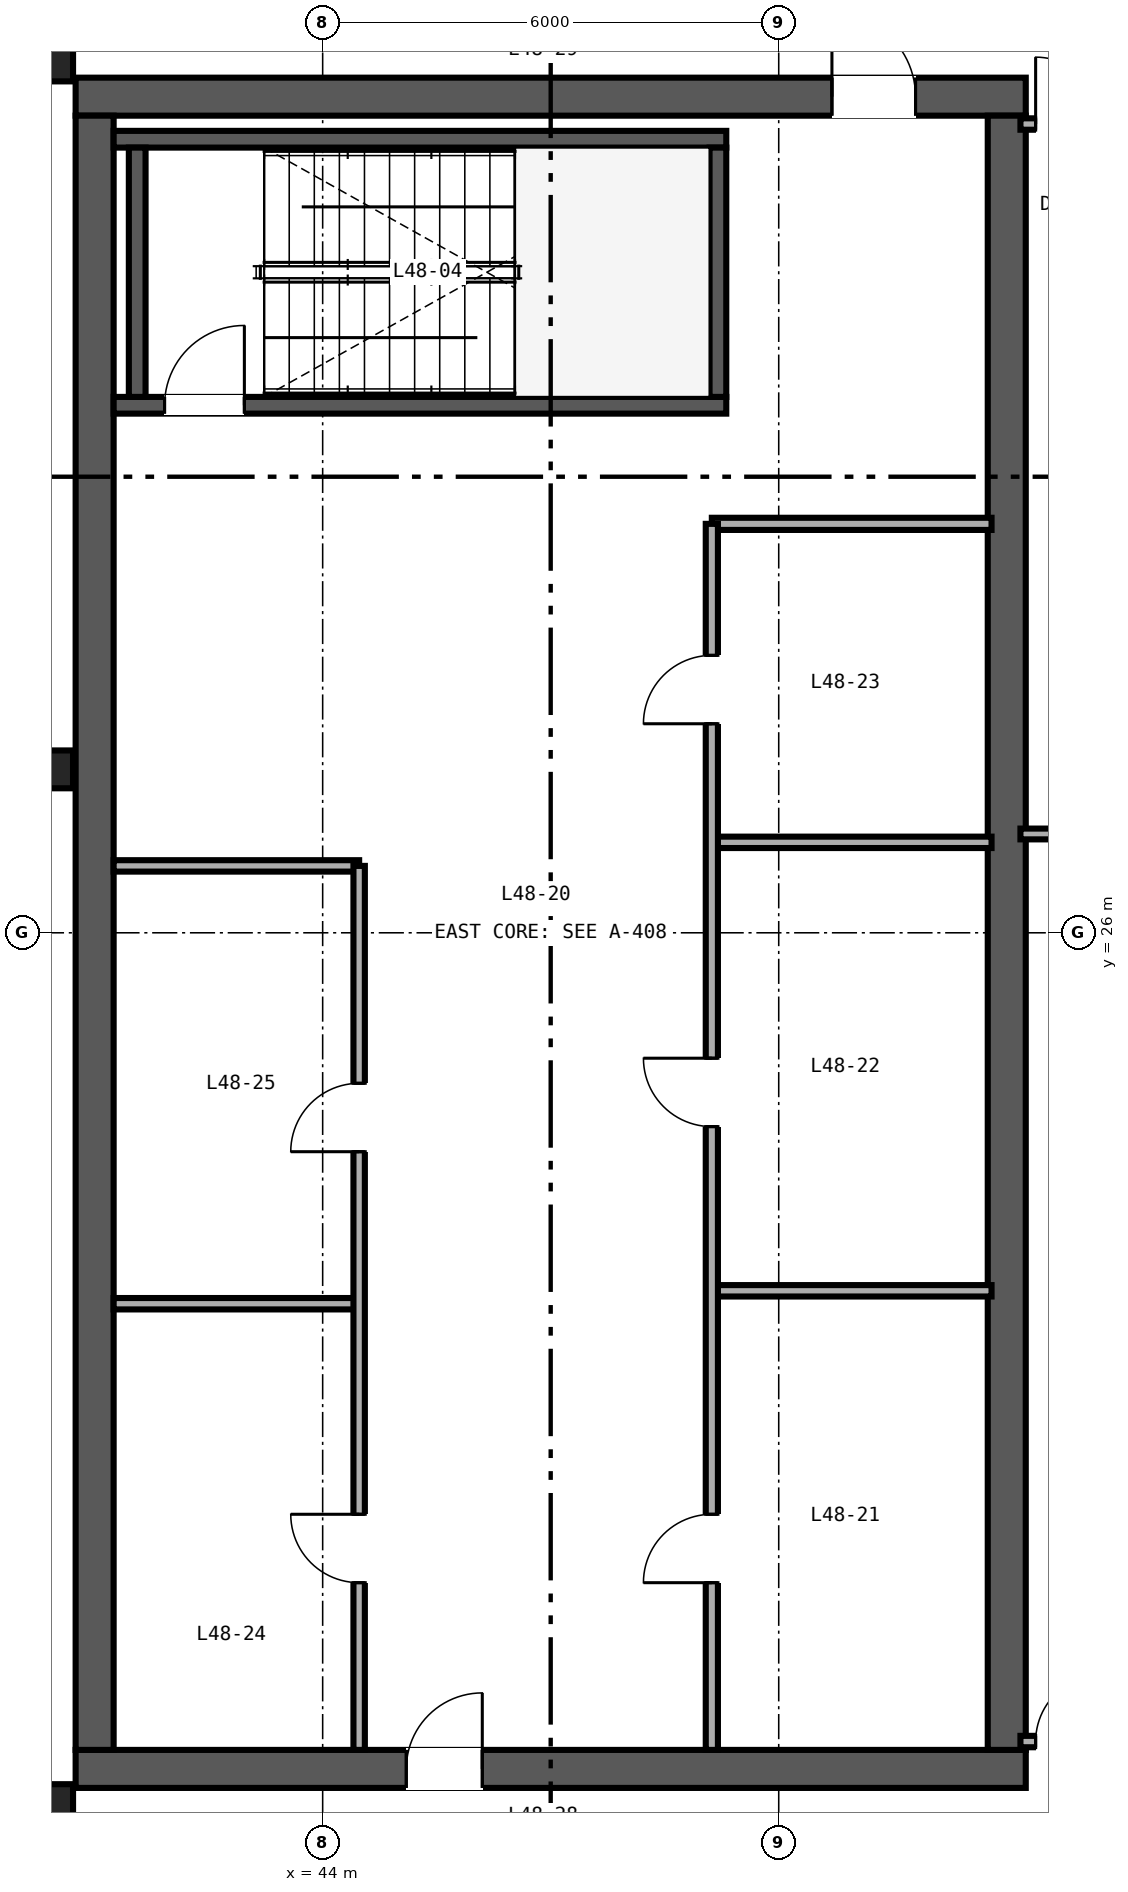
"""IFC4 building model, lengths in metres.
Left out: names, types, materials, properties, quantities, classifications, styles, units other than length and angle.
Written with IfcOpenShell. Run it as: python <this file> out.ifc"""

import sys

from ifc_helpers import new_model, si_unit, direction, frame, frame_2d, origin, origin_2d, place, context, subcontext, project, spatial, rectangle, i_section, extrude, source, transform, mapped, element, fill, save


model = new_model("IFC4")
c1 = context("Model", 3, precision=1e-05, world=origin(), true_north=direction((0.0, 1.0)))
c2 = subcontext(c1, "Body", "Model", "MODEL_VIEW")
j1 = project(units=[si_unit("LENGTHUNIT", "METRE"), si_unit("PLANEANGLEUNIT", "RADIAN")], contexts=[c1])
p1 = place(None, origin())
s1 = spatial("IfcSite", under=j1, at=p1, CompositionType="ELEMENT")
p2 = place(p1, origin())
s2 = spatial("IfcBuilding", under=s1, at=p2, CompositionType="ELEMENT")
p3 = place(p2, frame((0.0, 0.0, 192.0)))
s3 = spatial("IfcBuildingStorey", under=s2, at=p3, CompositionType="ELEMENT", Elevation=192.0)
p4 = place(p3, frame((40.75, 15.0, 0.0), z_axis=(0.0, 0.0, 1.0), x_axis=(1.0, 0.0, 0.0)))
e1 = element("IfcWall", 1, at=p4, inside=s3, PredefinedType="SHEAR", context=c2, shape_type="SweptSolid", body=[
    extrude(rectangle(XDim=12.5, YDim=0.5, at=frame_2d((6.25, 0.0))), origin(), (0.0, 0.0, 1.0), 3.37),
])
p5 = place(p4, frame((4.35, 0.0, 0.0)))
e2 = element("IfcOpeningElement", 2, at=p5, cuts=e1, PredefinedType="OPENING", context=c2, shape_type="SweptSolid", body=[
    extrude(rectangle(XDim=1.0, YDim=2.15, at=frame_2d((0.5, 1.075))), frame((0.0, 0.26, 0.0), z_axis=(0.0, -1.0, 0.0), x_axis=(1.0, 0.0, 0.0)), (0.0, 0.0, 1.0), 0.52),
])
p6 = place(p3, frame((40.75, 37.0, 0.0), z_axis=(0.0, 0.0, 1.0), x_axis=(1.0, 0.0, 0.0)))
e3 = element("IfcWall", 3, at=p6, inside=s3, PredefinedType="SHEAR", context=c2, shape_type="SweptSolid", body=[
    extrude(rectangle(XDim=12.5, YDim=0.5, at=frame_2d((6.25, 0.0))), origin(), (0.0, 0.0, 1.0), 3.37),
])
p7 = place(p6, frame((9.95, 0.0, 0.0)))
e4 = element("IfcOpeningElement", 4, at=p7, cuts=e3, PredefinedType="OPENING", context=c2, shape_type="SweptSolid", body=[
    extrude(rectangle(XDim=1.1, YDim=2.15, at=frame_2d((0.55, 1.075))), frame((0.0, 0.26, 0.0), z_axis=(0.0, -1.0, 0.0), x_axis=(1.0, 0.0, 0.0)), (0.0, 0.0, 1.0), 0.52),
])
for number, where, z_axis, x_axis in (
    (5, (41.0, 15.25, 0.0), (0.0, 0.0, 1.0), (0.0, 1.0, 0.0)),
    (6, (53.0, 15.25, 0.0), (0.0, 0.0, 1.0), (0.0, 1.0, 0.0)),
):
    element("IfcWall", number, at=place(p3, frame(where, z_axis=z_axis, x_axis=x_axis)), inside=s3, PredefinedType="SHEAR", context=c2, shape_type="SweptSolid", body=[
        extrude(rectangle(XDim=21.5, YDim=0.5, at=frame_2d((10.75, 0.0))), origin(), (0.0, 0.0, 1.0), 3.37),
    ])
p8 = place(p3, frame((41.25, 32.94, 0.0), z_axis=(0.0, 0.0, 1.0), x_axis=(1.0, 0.0, 0.0)))
e7 = element("IfcWall", 7, at=p8, inside=s3, PredefinedType="SHEAR", context=c2, shape_type="SweptSolid", body=[
    extrude(rectangle(XDim=8.06, YDim=0.22, at=frame_2d((4.03, 0.0))), origin(), (0.0, 0.0, 1.0), 3.4),
])
p9 = place(p8, frame((0.67, 0.0, 0.0)))
e8 = element("IfcOpeningElement", 8, at=p9, cuts=e7, PredefinedType="OPENING", context=c2, shape_type="SweptSolid", body=[
    extrude(rectangle(XDim=1.05, YDim=2.15, at=frame_2d((0.525, 1.075))), frame((0.0, 0.12, 0.0), z_axis=(0.0, -1.0, 0.0), x_axis=(1.0, 0.0, 0.0)), (0.0, 0.0, 1.0), 0.24),
])
p10 = place(p3, frame((41.25, 36.44, 0.0), z_axis=(0.0, 0.0, 1.0), x_axis=(1.0, 0.0, 0.0)))
e9 = element("IfcWall", 9, at=p10, inside=s3, PredefinedType="SHEAR", context=c2, shape_type="SweptSolid", body=[
    extrude(rectangle(XDim=8.06, YDim=0.22, at=frame_2d((4.03, 0.0))), origin(), (0.0, 0.0, 1.0), 3.4),
])
for number, where, z_axis, x_axis in (
    (10, (41.56, 33.05, 0.0), (0.0, 0.0, 1.0), (0.0, 1.0, 0.0)),
    (11, (49.2, 33.05, 0.0), (0.0, 0.0, 1.0), (0.0, 1.0, 0.0)),
):
    element("IfcWall", number, at=place(p3, frame(where, z_axis=z_axis, x_axis=x_axis)), inside=s3, PredefinedType="SHEAR", context=c2, shape_type="SweptSolid", body=[
        extrude(rectangle(XDim=3.28, YDim=0.22, at=frame_2d((1.64, 0.0))), origin(), (0.0, 0.0, 1.0), 3.4),
    ])
m1 = source(origin(), c2, "Body", "SweptSolid", [
    extrude(i_section(OverallWidth=0.432, OverallDepth=0.498, WebThickness=0.056, FlangeThickness=0.089, FilletRadius=0.025, at=origin_2d()), origin(), (0.0, 0.0, 1.0), 3.37),
])
for number, where, z_axis, x_axis in (
    (12, (40.5, 14.55, 0.0), (0.0, 0.0, 1.0), (1.0, 0.0, 0.0)),
    (13, (40.5, 28.15, 0.0), (0.0, 0.0, 1.0), (1.0, 0.0, 0.0)),
    (14, (40.5, 37.45, 0.0), (0.0, 0.0, 1.0), (1.0, 0.0, 0.0)),
):
    element("IfcColumn", number, at=place(p3, frame(where, z_axis=z_axis, x_axis=x_axis)), inside=s3, PredefinedType="COLUMN", context=c2, shape_type="MappedRepresentation", body=[
        mapped(m1, transform((0.0, 0.0, 0.0), scale=1.0)),
    ])
p11 = place(p3, frame((49.12, 31.38, 0.0), z_axis=(0.0, 0.0, 1.0), x_axis=(1.0, 0.0, 0.0)))
e15 = element("IfcWall", 15, at=p11, inside=s3, PredefinedType="PARTITIONING", context=c2, shape_type="SweptSolid", body=[
    extrude(rectangle(XDim=3.68, YDim=0.16, at=frame_2d((1.84, 0.0))), origin(), (0.0, 0.0, 1.0), 2.47),
])
for number, where, z_axis, x_axis in (
    (16, (49.12, 21.29, 0.0), (0.0, 0.0, 1.0), (1.0, 0.0, 0.0)),
    (17, (49.12, 27.19, 0.0), (0.0, 0.0, 1.0), (1.0, 0.0, 0.0)),
):
    element("IfcWall", number, at=place(p3, frame(where, z_axis=z_axis, x_axis=x_axis)), inside=s3, PredefinedType="PARTITIONING", context=c2, shape_type="SweptSolid", body=[
        extrude(rectangle(XDim=3.68, YDim=0.15, at=frame_2d((1.84, 0.0))), origin(), (0.0, 0.0, 1.0), 3.37),
    ])
p12 = place(p3, frame((49.12, 15.25, 0.0), z_axis=(0.0, 0.0, 1.0), x_axis=(0.0, 1.0, 0.0)))
e18 = element("IfcWall", 18, at=p12, inside=s3, PredefinedType="PARTITIONING", context=c2, shape_type="SweptSolid", body=[
    extrude(rectangle(XDim=16.13, YDim=0.16, at=frame_2d((8.065, 0.0))), origin(), (0.0, 0.0, 1.0), 2.443),
])
p13 = place(p12, frame((2.2, 0.0, 0.0)))
e19 = element("IfcOpeningElement", 19, at=p13, cuts=e18, PredefinedType="OPENING", context=c2, shape_type="SweptSolid", body=[
    extrude(rectangle(XDim=0.9, YDim=2.15, at=frame_2d((0.45, 1.075))), frame((0.0, 0.09, 0.0), z_axis=(0.0, -1.0, 0.0), x_axis=(1.0, 0.0, 0.0)), (0.0, 0.0, 1.0), 0.18),
])
p14 = place(p12, frame((8.2, 0.0, 0.0)))
e20 = element("IfcOpeningElement", 20, at=p14, cuts=e18, PredefinedType="OPENING", context=c2, shape_type="SweptSolid", body=[
    extrude(rectangle(XDim=0.9, YDim=2.15, at=frame_2d((0.45, 1.075))), frame((0.0, 0.09, 0.0), z_axis=(0.0, -1.0, 0.0), x_axis=(1.0, 0.0, 0.0)), (0.0, 0.0, 1.0), 0.18),
])
p15 = place(p12, frame((13.5, 0.0, 0.0)))
e21 = element("IfcOpeningElement", 21, at=p15, cuts=e18, PredefinedType="OPENING", context=c2, shape_type="SweptSolid", body=[
    extrude(rectangle(XDim=0.9, YDim=2.15, at=frame_2d((0.45, 1.075))), frame((0.0, 0.09, 0.0), z_axis=(0.0, -1.0, 0.0), x_axis=(1.0, 0.0, 0.0)), (0.0, 0.0, 1.0), 0.18),
])
for number, where, z_axis, x_axis in (
    (22, (41.25, 26.88, 0.0), (0.0, 0.0, 1.0), (1.0, 0.0, 0.0)),
    (23, (41.25, 21.12, 0.0), (0.0, 0.0, 1.0), (1.0, 0.0, 0.0)),
):
    element("IfcWall", number, at=place(p3, frame(where, z_axis=z_axis, x_axis=x_axis)), inside=s3, PredefinedType="PARTITIONING", context=c2, shape_type="SweptSolid", body=[
        extrude(rectangle(XDim=3.23, YDim=0.15, at=frame_2d((1.615, 0.0))), origin(), (0.0, 0.0, 1.0), 3.37),
    ])
p16 = place(p3, frame((44.48, 15.25, 0.0), z_axis=(0.0, 0.0, 1.0), x_axis=(0.0, 1.0, 0.0)))
e24 = element("IfcWall", 24, at=p16, inside=s3, PredefinedType="PARTITIONING", context=c2, shape_type="SweptSolid", body=[
    extrude(rectangle(XDim=11.63, YDim=0.15, at=frame_2d((5.815, 0.0))), origin(), (0.0, 0.0, 1.0), 3.37),
])
p17 = place(p16, frame((2.2, 0.0, 0.0)))
e25 = element("IfcOpeningElement", 25, at=p17, cuts=e24, PredefinedType="OPENING", context=c2, shape_type="SweptSolid", body=[
    extrude(rectangle(XDim=0.9, YDim=2.15, at=frame_2d((0.45, 1.075))), frame((0.0, 0.085, 0.0), z_axis=(0.0, -1.0, 0.0), x_axis=(1.0, 0.0, 0.0)), (0.0, 0.0, 1.0), 0.17),
])
p18 = place(p16, frame((7.87, 0.0, 0.0)))
e26 = element("IfcOpeningElement", 26, at=p18, cuts=e24, PredefinedType="OPENING", context=c2, shape_type="SweptSolid", body=[
    extrude(rectangle(XDim=0.9, YDim=2.15, at=frame_2d((0.45, 1.075))), frame((0.0, 0.085, 0.0), z_axis=(0.0, -1.0, 0.0), x_axis=(1.0, 0.0, 0.0)), (0.0, 0.0, 1.0), 0.17),
])
p19 = place(p3, frame((53.18, 15.36, 0.0), z_axis=(0.0, 0.0, 1.0), x_axis=(1.0, 0.0, 0.0)))
e27 = element("IfcWall", 27, at=p19, inside=s3, PredefinedType="PARTITIONING", context=c2, shape_type="SweptSolid", body=[
    extrude(rectangle(XDim=2.66, YDim=0.15, at=frame_2d((1.33, 0.0))), origin(), (0.0, 0.0, 1.0), 2.591),
])
p20 = place(p19, frame((0.2, 0.0, 0.0)))
e28 = element("IfcOpeningElement", 28, at=p20, cuts=e27, PredefinedType="OPENING", context=c2, shape_type="SweptSolid", body=[
    extrude(rectangle(XDim=0.88, YDim=2.15, at=frame_2d((0.44, 1.075))), frame((0.0, 0.085, 0.0), z_axis=(0.0, -1.0, 0.0), x_axis=(1.0, 0.0, 0.0)), (0.0, 0.0, 1.0), 0.17),
])
p21 = place(p3, frame((53.18, 36.64, 0.0), z_axis=(0.0, 0.0, 1.0), x_axis=(1.0, 0.0, 0.0)))
e29 = element("IfcWall", 29, at=p21, inside=s3, PredefinedType="PARTITIONING", context=c2, shape_type="SweptSolid", body=[
    extrude(rectangle(XDim=2.66, YDim=0.15, at=frame_2d((1.33, 0.0))), origin(), (0.0, 0.0, 1.0), 2.753),
])
p22 = place(p21, frame((0.2, 0.0, 0.0)))
e30 = element("IfcOpeningElement", 30, at=p22, cuts=e29, PredefinedType="OPENING", context=c2, shape_type="SweptSolid", body=[
    extrude(rectangle(XDim=0.88, YDim=2.15, at=frame_2d((0.44, 1.075))), frame((0.0, 0.085, 0.0), z_axis=(0.0, -1.0, 0.0), x_axis=(1.0, 0.0, 0.0)), (0.0, 0.0, 1.0), 0.17),
])
p23 = place(p3, frame((53.18, 27.3, 0.0), z_axis=(0.0, 0.0, 1.0), x_axis=(1.0, 0.0, 0.0)))
e31 = element("IfcWall", 31, at=p23, inside=s3, PredefinedType="PARTITIONING", context=c2, shape_type="SweptSolid", body=[
    extrude(rectangle(XDim=2.66, YDim=0.142, at=frame_2d((1.33, 0.0))), origin(), (0.0, 0.0, 1.0), 2.591),
])
m2 = source(origin(), c2, "Body", "SweptSolid", [
    extrude(rectangle(XDim=1.05, YDim=2.15, at=frame_2d((0.525, 1.075))), frame((0.0, 0.025, 0.0), z_axis=(0.0, -1.0, 0.0), x_axis=(1.0, 0.0, 0.0)), (0.0, 0.0, 1.0), 0.05),
])
p24 = place(p9, origin())
e32 = element("IfcDoor", 32, at=p24, inside=s3, OperationType="SINGLE_SWING_RIGHT", PredefinedType="DOOR", context=c2, shape_type="MappedRepresentation", body=[
    mapped(m2, transform((0.0, 0.0, 0.0), scale=1.0)),
])
fill(e8, e32)
m3 = source(origin(), c2, "Body", "SweptSolid", [
    extrude(rectangle(XDim=1.0, YDim=2.15, at=frame_2d((0.5, 1.075))), frame((0.0, 0.025, 0.0), z_axis=(0.0, -1.0, 0.0), x_axis=(1.0, 0.0, 0.0)), (0.0, 0.0, 1.0), 0.05),
])
p25 = place(p5, origin())
e33 = element("IfcDoor", 33, at=p25, inside=s3, OperationType="SINGLE_SWING_RIGHT", PredefinedType="DOOR", context=c2, shape_type="MappedRepresentation", body=[
    mapped(m3, transform((0.0, 0.0, 0.0), scale=1.0)),
])
fill(e2, e33)
m4 = source(origin(), c2, "Body", "SweptSolid", [
    extrude(rectangle(XDim=1.1, YDim=2.15, at=frame_2d((0.55, 1.075))), frame((0.0, 0.025, 0.0), z_axis=(0.0, -1.0, 0.0), x_axis=(1.0, 0.0, 0.0)), (0.0, 0.0, 1.0), 0.05),
])
p26 = place(p7, origin())
e34 = element("IfcDoor", 34, at=p26, inside=s3, OperationType="SINGLE_SWING_LEFT", PredefinedType="DOOR", context=c2, shape_type="MappedRepresentation", body=[
    mapped(m4, transform((0.0, 0.0, 0.0), scale=1.0)),
])
fill(e4, e34)
m5 = source(origin(), c2, "Body", "SweptSolid", [
    extrude(rectangle(XDim=0.9, YDim=2.15, at=frame_2d((0.45, 1.075))), frame((0.0, 0.025, 0.0), z_axis=(0.0, -1.0, 0.0), x_axis=(1.0, 0.0, 0.0)), (0.0, 0.0, 1.0), 0.05),
])
p27 = place(p13, origin())
e35 = element("IfcDoor", 35, at=p27, inside=s3, OperationType="SINGLE_SWING_LEFT", PredefinedType="DOOR", context=c2, shape_type="MappedRepresentation", body=[
    mapped(m5, transform((0.0, 0.0, 0.0), scale=1.0)),
])
fill(e19, e35)
p28 = place(p14, origin())
e36 = element("IfcDoor", 36, at=p28, inside=s3, OperationType="SINGLE_SWING_RIGHT", PredefinedType="DOOR", context=c2, shape_type="MappedRepresentation", body=[
    mapped(m5, transform((0.0, 0.0, 0.0), scale=1.0)),
])
fill(e20, e36)
p29 = place(p15, origin())
e37 = element("IfcDoor", 37, at=p29, inside=s3, OperationType="SINGLE_SWING_LEFT", PredefinedType="DOOR", context=c2, shape_type="MappedRepresentation", body=[
    mapped(m5, transform((0.0, 0.0, 0.0), scale=1.0)),
])
fill(e21, e37)
p30 = place(p17, origin())
e38 = element("IfcDoor", 38, at=p30, inside=s3, OperationType="SINGLE_SWING_RIGHT", PredefinedType="DOOR", context=c2, shape_type="MappedRepresentation", body=[
    mapped(m5, transform((0.0, 0.0, 0.0), scale=1.0)),
])
fill(e25, e38)
p31 = place(p18, origin())
e39 = element("IfcDoor", 39, at=p31, inside=s3, OperationType="SINGLE_SWING_LEFT", PredefinedType="DOOR", context=c2, shape_type="MappedRepresentation", body=[
    mapped(m5, transform((0.0, 0.0, 0.0), scale=1.0)),
])
fill(e26, e39)
m6 = source(origin(), c2, "Body", "SweptSolid", [
    extrude(rectangle(XDim=0.88, YDim=2.15, at=frame_2d((0.44, 1.075))), frame((0.0, 0.025, 0.0), z_axis=(0.0, -1.0, 0.0), x_axis=(1.0, 0.0, 0.0)), (0.0, 0.0, 1.0), 0.05),
])
p32 = place(p20, origin())
e40 = element("IfcDoor", 40, at=p32, inside=s3, OperationType="SINGLE_SWING_RIGHT", PredefinedType="DOOR", context=c2, shape_type="MappedRepresentation", body=[
    mapped(m6, transform((0.0, 0.0, 0.0), scale=1.0)),
])
fill(e28, e40)
p33 = place(p22, origin())
e41 = element("IfcDoor", 41, at=p33, inside=s3, OperationType="SINGLE_SWING_LEFT", PredefinedType="DOOR", context=c2, shape_type="MappedRepresentation", body=[
    mapped(m6, transform((0.0, 0.0, 0.0), scale=1.0)),
])
fill(e30, e41)
save(model, sys.argv[1])
